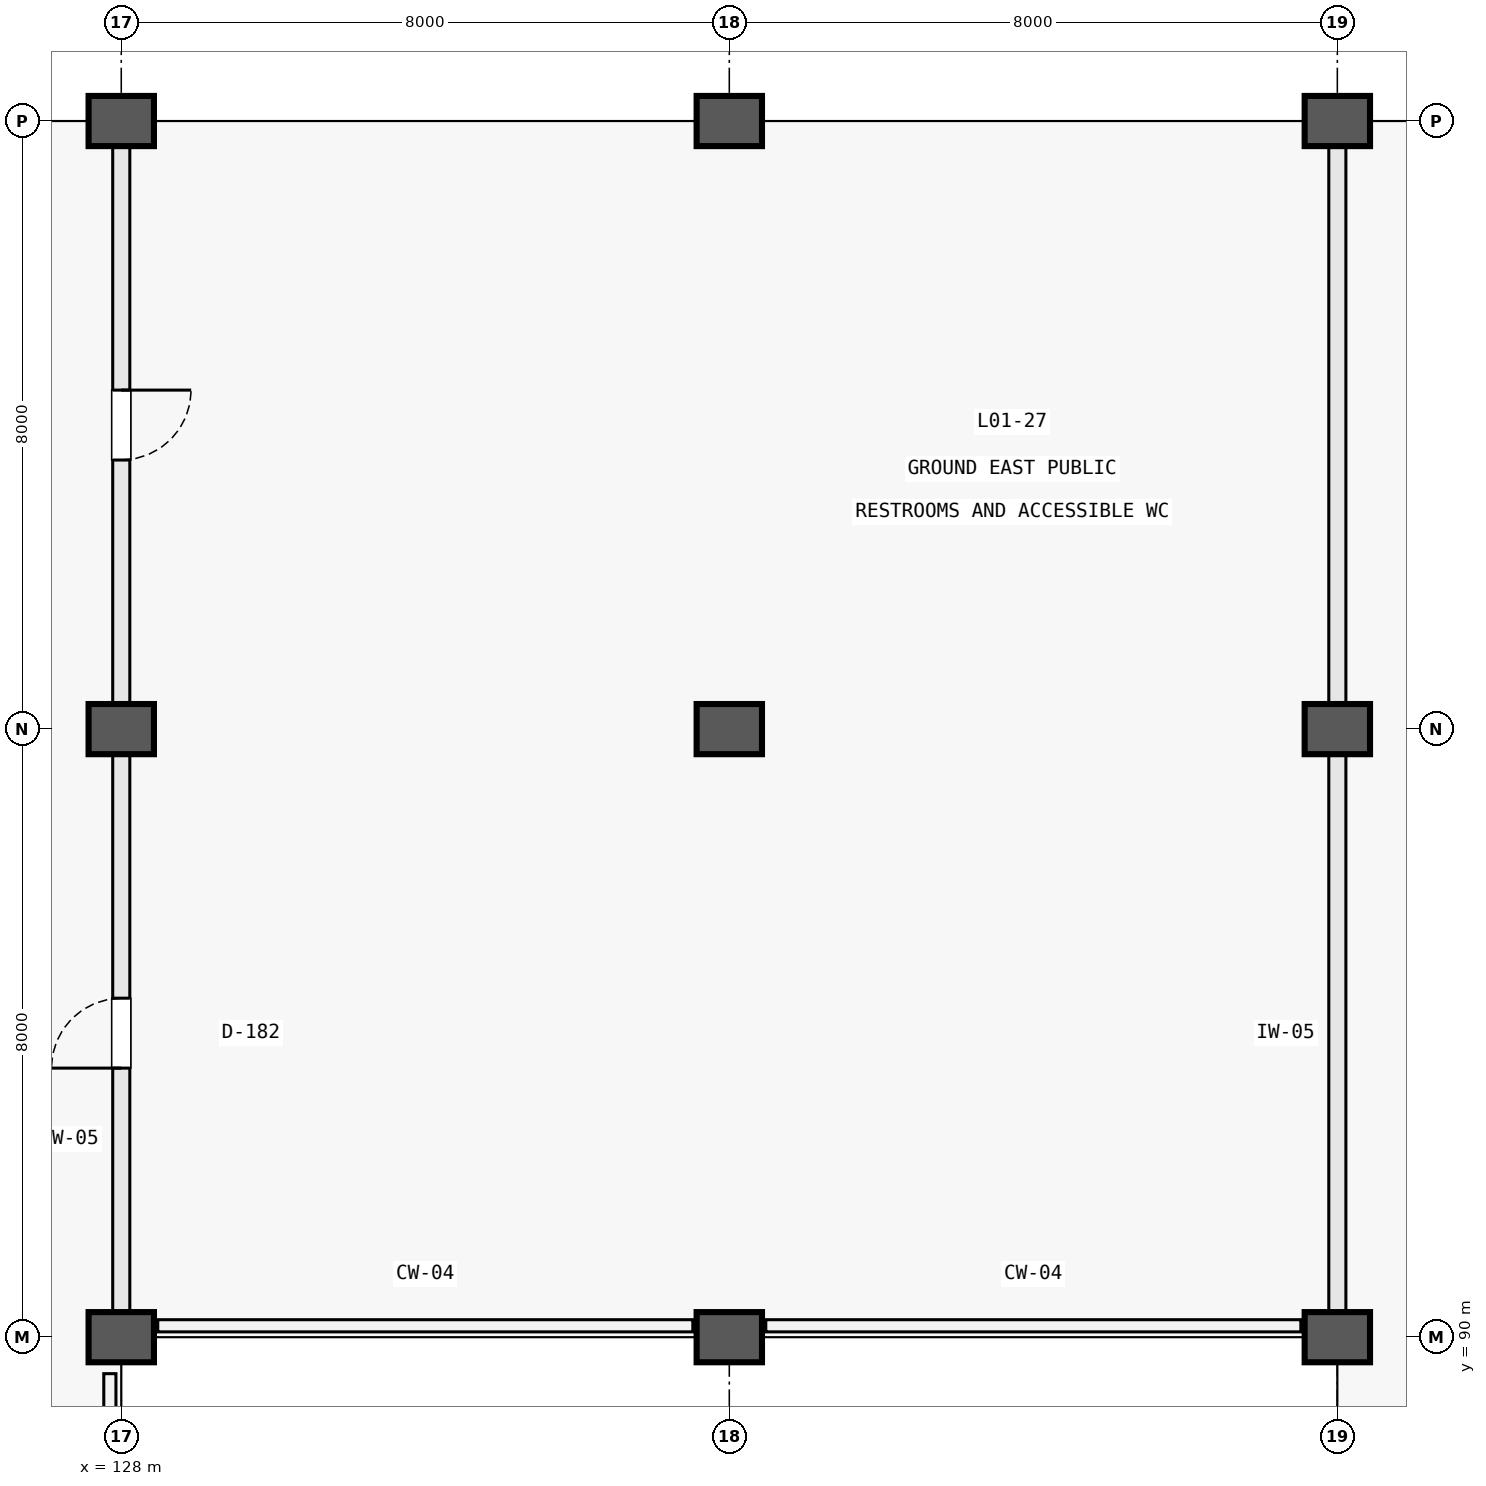
"""IFC4 building model, lengths in metres.
Left out: names, types, materials, properties, quantities, classifications, styles, units other than length and angle.
Written with IfcOpenShell. Run it as: python <this file> out.ifc"""

import sys

from ifc_helpers import new_model, si_unit, direction, frame, frame_2d, origin, origin_2d, place, context, subcontext, project, spatial, rectangle, extrude, element, fill, save


model = new_model("IFC4")
c1 = context("Model", 3, precision=1e-05, world=origin(), true_north=direction((0.0, 1.0)))
c2 = subcontext(c1, "Body", "Model", "MODEL_VIEW")
j1 = project(units=[si_unit("LENGTHUNIT", "METRE"), si_unit("PLANEANGLEUNIT", "RADIAN")], contexts=[c1])
p1 = place(None, origin())
s1 = spatial("IfcSite", under=j1, at=p1, CompositionType="ELEMENT")
p2 = place(p1, origin())
s2 = spatial("IfcBuilding", under=s1, at=p2, CompositionType="ELEMENT")
p3 = place(p2, origin())
s3 = spatial("IfcBuildingStorey", under=s2, at=p3, CompositionType="ELEMENT", Elevation=0.0)
for number, where, z_axis, x_axis in (
    (1, (128.0, 90.0, 0.0), (0.0, 0.0, 1.0), (1.0, 0.0, 0.0)),
    (2, (128.0, 98.0, 0.0), (0.0, 0.0, 1.0), (1.0, 0.0, 0.0)),
    (3, (128.0, 106.0, 0.0), (0.0, 0.0, 1.0), (1.0, 0.0, 0.0)),
    (4, (136.0, 90.0, 0.0), (0.0, 0.0, 1.0), (1.0, 0.0, 0.0)),
    (5, (136.0, 98.0, 0.0), (0.0, 0.0, 1.0), (1.0, 0.0, 0.0)),
    (6, (136.0, 106.0, 0.0), (0.0, 0.0, 1.0), (1.0, 0.0, 0.0)),
    (7, (144.0, 90.0, 0.0), (0.0, 0.0, 1.0), (1.0, 0.0, 0.0)),
    (8, (144.0, 98.0, 0.0), (0.0, 0.0, 1.0), (1.0, 0.0, 0.0)),
    (9, (144.0, 106.0, 0.0), (0.0, 0.0, 1.0), (1.0, 0.0, 0.0)),
):
    element("IfcColumn", number, at=place(p3, frame(where, z_axis=z_axis, x_axis=x_axis)), inside=s3, PredefinedType="COLUMN", context=c2, shape_type="SweptSolid", body=[
        extrude(rectangle(XDim=0.86, YDim=0.66, at=origin_2d()), origin(), (0.0, 0.0, 1.0), 5.4),
    ])
p4 = place(p3, frame((128.0, 90.34, 0.0), z_axis=(0.0, 0.0, 1.0), x_axis=(0.0, 1.0, 0.0)))
e10 = element("IfcWall", 10, at=p4, inside=s3, PredefinedType="PARTITIONING", context=c2, shape_type="SweptSolid", body=[
    extrude(rectangle(XDim=7.32, YDim=0.225, at=frame_2d((3.66, 0.0))), origin(), (0.0, 0.0, 1.0), 3.88),
])
p5 = place(p4, frame((3.2, 0.0, 0.0)))
e11 = element("IfcOpeningElement", 11, at=p5, cuts=e10, PredefinedType="OPENING", context=c2, shape_type="SweptSolid", body=[
    extrude(rectangle(XDim=0.92, YDim=2.1, at=frame_2d((0.46, 1.05))), frame((0.0, 0.125, 0.0), z_axis=(0.0, -1.0, 0.0), x_axis=(1.0, 0.0, 0.0)), (0.0, 0.0, 1.0), 0.249),
])
p6 = place(p3, frame((128.0, 98.34, 0.0), z_axis=(0.0, 0.0, 1.0), x_axis=(0.0, 1.0, 0.0)))
e12 = element("IfcWall", 12, at=p6, inside=s3, PredefinedType="PARTITIONING", context=c2, shape_type="SweptSolid", body=[
    extrude(rectangle(XDim=7.32, YDim=0.225, at=frame_2d((3.66, 0.0))), origin(), (0.0, 0.0, 1.0), 3.88),
])
p7 = place(p6, frame((3.2, 0.0, 0.0)))
e13 = element("IfcOpeningElement", 13, at=p7, cuts=e12, PredefinedType="OPENING", context=c2, shape_type="SweptSolid", body=[
    extrude(rectangle(XDim=0.92, YDim=2.1, at=frame_2d((0.46, 1.05))), frame((0.0, 0.125, 0.0), z_axis=(0.0, -1.0, 0.0), x_axis=(1.0, 0.0, 0.0)), (0.0, 0.0, 1.0), 0.249),
])
for number, where, z_axis, x_axis in (
    (14, (144.0, 90.34, 0.0), (0.0, 0.0, 1.0), (0.0, 1.0, 0.0)),
    (15, (144.0, 98.34, 0.0), (0.0, 0.0, 1.0), (0.0, 1.0, 0.0)),
):
    element("IfcWall", number, at=place(p3, frame(where, z_axis=z_axis, x_axis=x_axis)), inside=s3, PredefinedType="PARTITIONING", context=c2, shape_type="SweptSolid", body=[
        extrude(rectangle(XDim=7.32, YDim=0.225, at=frame_2d((3.66, 0.0))), origin(), (0.0, 0.0, 1.0), 3.88),
    ])
p8 = place(p5, origin())
e16 = element("IfcDoor", 16, at=p8, inside=s3, OperationType="SINGLE_SWING_LEFT", PredefinedType="DOOR", context=c2, shape_type="SweptSolid", body=[
    extrude(rectangle(XDim=0.92, YDim=2.1, at=frame_2d((0.46, 1.05))), frame((0.0, 0.025, 0.0), z_axis=(0.0, -1.0, 0.0), x_axis=(1.0, 0.0, 0.0)), (0.0, 0.0, 1.0), 0.05),
])
fill(e11, e16)
p9 = place(p7, frame((0.92, 0.0, 0.0), z_axis=(0.0, 0.0, 1.0), x_axis=(-1.0, 0.0, 0.0)))
e17 = element("IfcDoor", 17, at=p9, inside=s3, OperationType="SINGLE_SWING_RIGHT", PredefinedType="DOOR", context=c2, shape_type="SweptSolid", body=[
    extrude(rectangle(XDim=0.92, YDim=2.1, at=frame_2d((0.46, 1.05))), frame((0.0, 0.025, 0.0), z_axis=(0.0, -1.0, 0.0), x_axis=(1.0, 0.0, 0.0)), (0.0, 0.0, 1.0), 0.05),
])
fill(e13, e17)
save(model, sys.argv[1])
